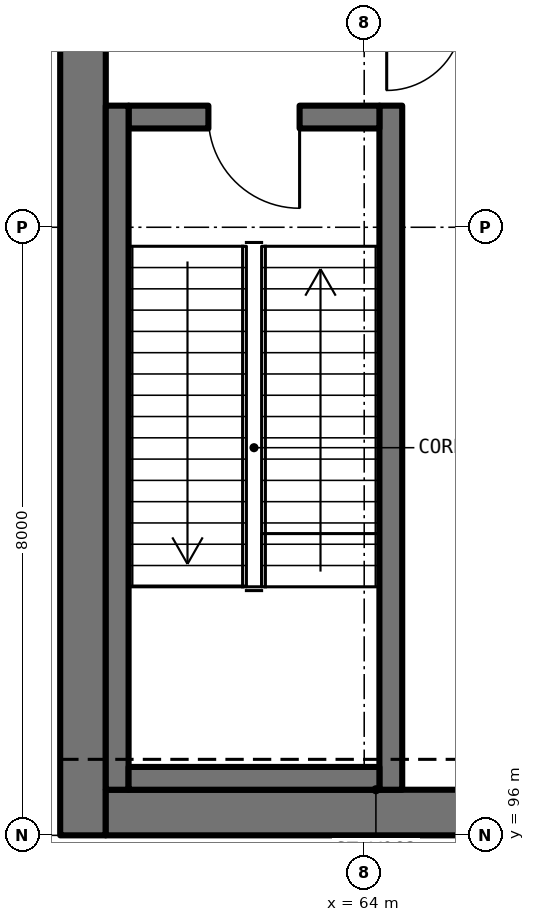
"""IFC4 building model, lengths in metres.
Left out: names, types, materials, properties, quantities, classifications, styles, units other than length and angle.
Written with IfcOpenShell. Run it as: python <this file> out.ifc"""

import sys

from ifc_helpers import new_model, si_unit, direction, frame, frame_2d, origin, place, context, subcontext, project, spatial, rectangle, extrude, element, fill, save


model = new_model("IFC4")
c1 = context("Model", 3, precision=1e-05, world=origin(), true_north=direction((0.0, 1.0)))
c2 = subcontext(c1, "Body", "Model", "MODEL_VIEW")
j1 = project(units=[si_unit("LENGTHUNIT", "METRE"), si_unit("PLANEANGLEUNIT", "RADIAN")], contexts=[c1])
p1 = place(None, origin())
s1 = spatial("IfcSite", under=j1, at=p1, CompositionType="ELEMENT")
p2 = place(p1, origin())
s2 = spatial("IfcBuilding", under=s1, at=p2, CompositionType="ELEMENT")
p3 = place(p2, frame((0.0, 0.0, -6.0)))
s3 = spatial("IfcBuildingStorey", under=s2, at=p3, CompositionType="ELEMENT", Elevation=-6.0)
p4 = place(p3, frame((60.3, 96.0, -0.3), z_axis=(0.0, 0.0, 1.0), x_axis=(0.0, 1.0, 0.0)))
e1 = element("IfcWall", 1, at=p4, inside=s3, PredefinedType="SHEAR", context=c2, shape_type="SweptSolid", body=[
    extrude(rectangle(XDim=24.3, YDim=0.6, at=frame_2d((12.15, 0.0))), origin(), (0.0, 0.0, 1.0), 6.3),
])
p5 = place(p3, frame((60.6, 96.3, -0.3), z_axis=(0.0, 0.0, 1.0), x_axis=(1.0, 0.0, 0.0)))
e2 = element("IfcWall", 2, at=p5, inside=s3, PredefinedType="SHEAR", context=c2, shape_type="SweptSolid", body=[
    extrude(rectangle(XDim=15.39, YDim=0.6, at=frame_2d((7.695, 0.0))), origin(), (0.0, 0.0, 1.0), 6.3),
])
p6 = place(p3, frame((64.35, 96.6, 0.0), z_axis=(0.0, 0.0, 1.0), x_axis=(0.0, 1.0, 0.0)))
e3 = element("IfcWall", 3, at=p6, inside=s3, PredefinedType="SOLIDWALL", context=c2, shape_type="SweptSolid", body=[
    extrude(rectangle(XDim=9.0, YDim=0.3, at=frame_2d((4.5, 0.0))), origin(), (0.0, 0.0, 1.0), 6.0),
])
p7 = place(p3, frame((64.2, 105.45, 0.0), z_axis=(0.0, 0.0, 1.0), x_axis=(-1.0, 0.0, 0.0)))
e4 = element("IfcWall", 4, at=p7, inside=s3, PredefinedType="SOLIDWALL", context=c2, shape_type="SweptSolid", body=[
    extrude(rectangle(XDim=3.3, YDim=0.3, at=frame_2d((1.65, 0.0))), origin(), (0.0, 0.0, 1.0), 6.0),
])
p8 = place(p7, frame((1.05, 0.0, 0.0)))
e5 = element("IfcOpeningElement", 5, at=p8, cuts=e4, PredefinedType="OPENING", context=c2, shape_type="SweptSolid", body=[
    extrude(rectangle(XDim=1.2, YDim=2.1, at=frame_2d((0.6, 1.05))), frame((0.0, 0.162, 0.0), z_axis=(0.0, -1.0, 0.0), x_axis=(1.0, 0.0, 0.0)), (0.0, 0.0, 1.0), 0.324),
])
p9 = place(p3, frame((60.75, 105.6, 0.0), z_axis=(0.0, 0.0, 1.0), x_axis=(0.0, -1.0, 0.0)))
e6 = element("IfcWall", 6, at=p9, inside=s3, PredefinedType="SOLIDWALL", context=c2, shape_type="SweptSolid", body=[
    extrude(rectangle(XDim=9.0, YDim=0.3, at=frame_2d((4.5, 0.0))), origin(), (0.0, 0.0, 1.0), 6.0),
])
p10 = place(p3, frame((60.9, 96.75, 0.0), z_axis=(0.0, 0.0, 1.0), x_axis=(1.0, 0.0, 0.0)))
e7 = element("IfcWall", 7, at=p10, inside=s3, PredefinedType="SOLIDWALL", context=c2, shape_type="SweptSolid", body=[
    extrude(rectangle(XDim=3.3, YDim=0.3, at=frame_2d((1.65, 0.0))), origin(), (0.0, 0.0, 1.0), 6.0),
])
p11 = place(p8, origin())
e8 = element("IfcDoor", 8, at=p11, inside=s3, OperationType="SINGLE_SWING_LEFT", PredefinedType="DOOR", context=c2, shape_type="SweptSolid", body=[
    extrude(rectangle(XDim=1.2, YDim=2.1, at=frame_2d((0.6, 1.05))), frame((0.0, 0.025, 0.0), z_axis=(0.0, -1.0, 0.0), x_axis=(1.0, 0.0, 0.0)), (0.0, 0.0, 1.0), 0.05),
])
fill(e5, e8)
save(model, sys.argv[1])
